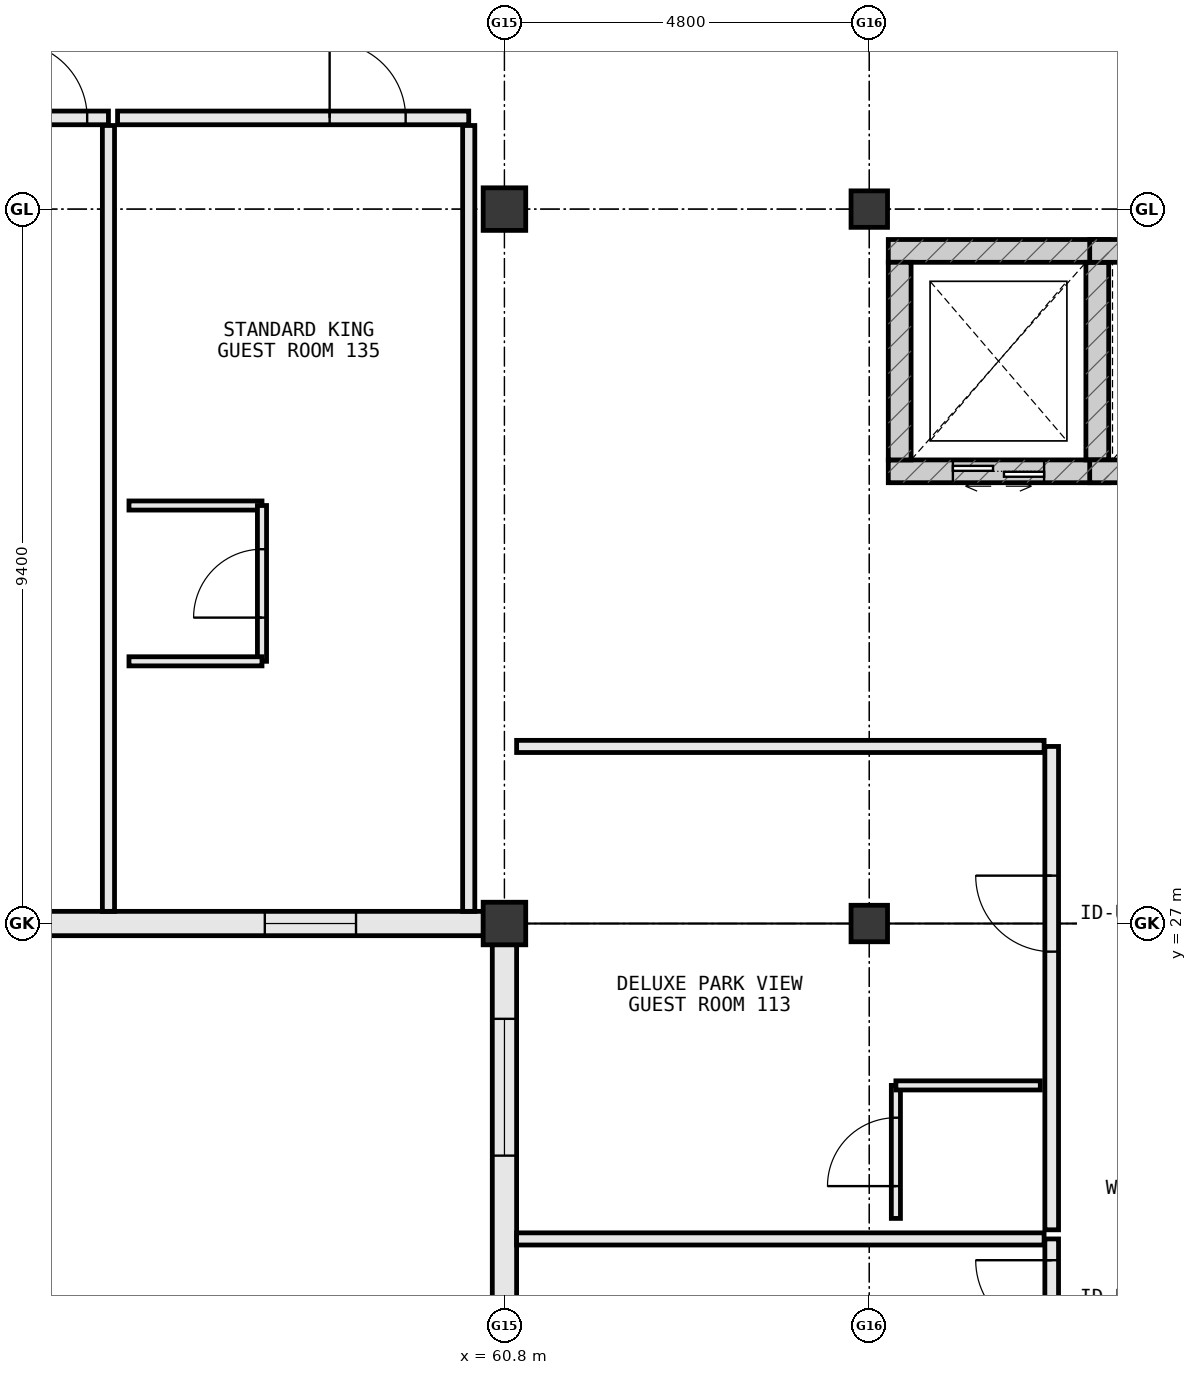
"""IFC4 building model, lengths in metres.
Left out: names, types, materials, properties, quantities, classifications, styles, units other than length and angle.
Written with IfcOpenShell. Run it as: python <this file> out.ifc"""

import sys

from ifc_helpers import new_model, si_unit, direction, frame, frame_2d, origin, origin_2d, place, context, subcontext, project, spatial, rectangle, extrude, element, fill, save


model = new_model("IFC4")
c1 = context("Model", 3, precision=1e-05, world=origin(), true_north=direction((0.0, 1.0)))
c2 = subcontext(c1, "Body", "Model", "MODEL_VIEW")
j1 = project(units=[si_unit("LENGTHUNIT", "METRE"), si_unit("PLANEANGLEUNIT", "RADIAN")], contexts=[c1])
p1 = place(None, origin())
s1 = spatial("IfcSite", under=j1, at=p1, CompositionType="ELEMENT")
p2 = place(p1, origin())
s2 = spatial("IfcBuilding", under=s1, at=p2, CompositionType="ELEMENT")
p3 = place(p2, frame((0.0, 0.0, 20.0)))
s3 = spatial("IfcBuildingStorey", under=s2, at=p3, CompositionType="ELEMENT", Elevation=20.0)
for number, where, z_axis, x_axis in (
    (1, (60.8, 27.0, 0.0), (0.0, 0.0, 1.0), (1.0, 0.0, 0.0)),
    (2, (60.8, 36.4, 0.0), (0.0, 0.0, 1.0), (1.0, 0.0, 0.0)),
):
    element("IfcColumn", number, at=place(p3, frame(where, z_axis=z_axis, x_axis=x_axis)), inside=s3, PredefinedType="COLUMN", context=c2, shape_type="SweptSolid", body=[
        extrude(rectangle(XDim=0.56, YDim=0.56, at=origin_2d()), origin(), (0.0, 0.0, 1.0), 3.8),
    ])
for number, where, z_axis, x_axis in (
    (3, (65.6, 27.0, 0.0), (0.0, 0.0, 1.0), (1.0, 0.0, 0.0)),
    (4, (65.6, 36.4, 0.0), (0.0, 0.0, 1.0), (1.0, 0.0, 0.0)),
):
    element("IfcColumn", number, at=place(p3, frame(where, z_axis=z_axis, x_axis=x_axis)), inside=s3, PredefinedType="COLUMN", context=c2, shape_type="SweptSolid", body=[
        extrude(rectangle(XDim=0.48, YDim=0.48, at=origin_2d()), origin(), (0.0, 0.0, 1.0), 3.8),
    ])
p4 = place(p3, frame((51.423, 27.0, 0.0), z_axis=(0.0, 0.0, 1.0), x_axis=(1.0, 0.0, 0.0)))
e5 = element("IfcWall", 5, at=p4, inside=s3, PredefinedType="STANDARD", context=c2, shape_type="SweptSolid", body=[
    extrude(rectangle(XDim=9.099, YDim=0.32, at=frame_2d((4.549, 0.0))), origin(), (0.0, 0.0, 1.0), 2.785),
])
p5 = place(p4, frame((1.675, 0.0, 0.85)))
e6 = element("IfcOpeningElement", 6, at=p5, cuts=e5, PredefinedType="OPENING", context=c2, shape_type="SweptSolid", body=[
    extrude(rectangle(XDim=1.2, YDim=1.55, at=frame_2d((0.6, 0.775))), frame((0.0, 0.172, 0.0), z_axis=(0.0, -1.0, 0.0), x_axis=(1.0, 0.0, 0.0)), (0.0, 0.0, 1.0), 0.344),
])
p6 = place(p4, frame((6.224, 0.0, 0.85)))
e7 = element("IfcOpeningElement", 7, at=p6, cuts=e5, PredefinedType="OPENING", context=c2, shape_type="SweptSolid", body=[
    extrude(rectangle(XDim=1.2, YDim=1.55, at=frame_2d((0.6, 0.775))), frame((0.0, 0.172, 0.0), z_axis=(0.0, -1.0, 0.0), x_axis=(1.0, 0.0, 0.0)), (0.0, 0.0, 1.0), 0.344),
])
p7 = place(p3, frame((60.8, 26.722, 0.0), z_axis=(0.0, 0.0, 1.0), x_axis=(0.0, -1.0, 0.0)))
e8 = element("IfcWall", 8, at=p7, inside=s3, PredefinedType="STANDARD", context=c2, shape_type="SweptSolid", body=[
    extrude(rectangle(XDim=7.844, YDim=0.32, at=frame_2d((3.922, 0.0))), origin(), (0.0, 0.0, 1.0), 3.005),
])
p8 = place(p7, frame((4.632, 0.0, 0.85)))
e9 = element("IfcOpeningElement", 9, at=p8, cuts=e8, PredefinedType="OPENING", context=c2, shape_type="SweptSolid", body=[
    extrude(rectangle(XDim=1.8, YDim=1.85, at=frame_2d((0.9, 0.925))), frame((0.0, 0.172, 0.0), z_axis=(0.0, -1.0, 0.0), x_axis=(1.0, 0.0, 0.0)), (0.0, 0.0, 1.0), 0.344),
])
p9 = place(p7, frame((0.976, 0.0, 0.85)))
e10 = element("IfcOpeningElement", 10, at=p9, cuts=e8, PredefinedType="OPENING", context=c2, shape_type="SweptSolid", body=[
    extrude(rectangle(XDim=1.8, YDim=1.85, at=frame_2d((0.9, 0.925))), frame((0.0, 0.172, 0.0), z_axis=(0.0, -1.0, 0.0), x_axis=(1.0, 0.0, 0.0)), (0.0, 0.0, 1.0), 0.344),
])
p10 = place(p3, frame((65.85, 32.95, 0.0), z_axis=(0.0, 0.0, 1.0), x_axis=(1.0, 0.0, 0.0)))
e11 = element("IfcWall", 11, at=p10, inside=s3, PredefinedType="SHEAR", context=c2, shape_type="SweptSolid", body=[
    extrude(rectangle(XDim=2.9, YDim=0.3, at=frame_2d((1.45, 0.0))), origin(), (0.0, 0.0, 1.0), 3.8),
])
p11 = place(p10, frame((0.85, 0.0, 0.0)))
e12 = element("IfcOpeningElement", 12, at=p11, cuts=e11, PredefinedType="OPENING", context=c2, shape_type="SweptSolid", body=[
    extrude(rectangle(XDim=1.2, YDim=2.2, at=frame_2d((0.6, 1.1))), frame((0.0, 0.162, 0.0), z_axis=(0.0, -1.0, 0.0), x_axis=(1.0, 0.0, 0.0)), (0.0, 0.0, 1.0), 0.324),
])
p12 = place(p3, frame((68.75, 35.85, 0.0), z_axis=(0.0, 0.0, 1.0), x_axis=(-1.0, 0.0, 0.0)))
e13 = element("IfcWall", 13, at=p12, inside=s3, PredefinedType="SHEAR", context=c2, shape_type="SweptSolid", body=[
    extrude(rectangle(XDim=2.9, YDim=0.3, at=frame_2d((1.45, 0.0))), origin(), (0.0, 0.0, 1.0), 3.8),
])
for number, where, z_axis, x_axis in (
    (14, (68.6, 33.1, 0.0), (0.0, 0.0, 1.0), (0.0, 1.0, 0.0)),
    (15, (66.0, 35.7, 0.0), (0.0, 0.0, 1.0), (0.0, -1.0, 0.0)),
):
    element("IfcWall", number, at=place(p3, frame(where, z_axis=z_axis, x_axis=x_axis)), inside=s3, PredefinedType="SHEAR", context=c2, shape_type="SweptSolid", body=[
        extrude(rectangle(XDim=2.6, YDim=0.3, at=frame_2d((1.3, 0.0))), origin(), (0.0, 0.0, 1.0), 3.8),
    ])
p13 = place(p3, frame((68.5, 32.95, 0.0), z_axis=(0.0, 0.0, 1.0), x_axis=(1.0, 0.0, 0.0)))
e16 = element("IfcWall", 16, at=p13, inside=s3, PredefinedType="SHEAR", context=c2, shape_type="SweptSolid", body=[
    extrude(rectangle(XDim=2.9, YDim=0.3, at=frame_2d((1.45, 0.0))), origin(), (0.0, 0.0, 1.0), 3.8),
])
p14 = place(p13, frame((0.85, 0.0, 0.0)))
e17 = element("IfcOpeningElement", 17, at=p14, cuts=e16, PredefinedType="OPENING", context=c2, shape_type="SweptSolid", body=[
    extrude(rectangle(XDim=1.2, YDim=2.2, at=frame_2d((0.6, 1.1))), frame((0.0, 0.162, 0.0), z_axis=(0.0, -1.0, 0.0), x_axis=(1.0, 0.0, 0.0)), (0.0, 0.0, 1.0), 0.324),
])
p15 = place(p3, frame((71.4, 35.85, 0.0), z_axis=(0.0, 0.0, 1.0), x_axis=(-1.0, 0.0, 0.0)))
e18 = element("IfcWall", 18, at=p15, inside=s3, PredefinedType="SHEAR", context=c2, shape_type="SweptSolid", body=[
    extrude(rectangle(XDim=2.9, YDim=0.3, at=frame_2d((1.45, 0.0))), origin(), (0.0, 0.0, 1.0), 3.8),
])
p16 = place(p3, frame((68.0, 19.53, 0.0), z_axis=(0.0, 0.0, 1.0), x_axis=(0.0, 1.0, 0.0)))
e19 = element("IfcWall", 19, at=p16, inside=s3, PredefinedType="PARTITIONING", context=c2, shape_type="SweptSolid", body=[
    extrude(rectangle(XDim=3.32, YDim=0.18, at=frame_2d((1.66, 0.0))), origin(), (0.0, 0.0, 1.0), 3.55),
])
p17 = place(p16, frame((2.04, 0.0, 0.0)))
e20 = element("IfcOpeningElement", 20, at=p17, cuts=e19, PredefinedType="OPENING", context=c2, shape_type="SweptSolid", body=[
    extrude(rectangle(XDim=1.0, YDim=2.2, at=frame_2d((0.5, 1.1))), frame((0.0, 0.102, 0.0), z_axis=(0.0, -1.0, 0.0), x_axis=(1.0, 0.0, 0.0)), (0.0, 0.0, 1.0), 0.204),
])
p18 = place(p3, frame((60.96, 22.85, 0.0), z_axis=(0.0, 0.0, 1.0), x_axis=(1.0, 0.0, 0.0)))
e21 = element("IfcWall", 21, at=p18, inside=s3, PredefinedType="PARTITIONING", context=c2, shape_type="SweptSolid", body=[
    extrude(rectangle(XDim=6.94, YDim=0.16, at=frame_2d((3.47, 0.0))), origin(), (0.0, 0.0, 1.0), 3.55),
])
p19 = place(p3, frame((68.0, 22.97, 0.0), z_axis=(0.0, 0.0, 1.0), x_axis=(0.0, 1.0, 0.0)))
e22 = element("IfcWall", 22, at=p19, inside=s3, PredefinedType="PARTITIONING", context=c2, shape_type="SweptSolid", body=[
    extrude(rectangle(XDim=6.36, YDim=0.18, at=frame_2d((3.18, 0.0))), origin(), (0.0, 0.0, 1.0), 3.55),
])
p20 = place(p19, frame((3.66, 0.0, 0.0)))
e23 = element("IfcOpeningElement", 23, at=p20, cuts=e22, PredefinedType="OPENING", context=c2, shape_type="SweptSolid", body=[
    extrude(rectangle(XDim=1.0, YDim=2.2, at=frame_2d((0.5, 1.1))), frame((0.0, 0.102, 0.0), z_axis=(0.0, -1.0, 0.0), x_axis=(1.0, 0.0, 0.0)), (0.0, 0.0, 1.0), 0.204),
])
p21 = place(p3, frame((60.96, 29.33, 0.0), z_axis=(0.0, 0.0, 1.0), x_axis=(1.0, 0.0, 0.0)))
e24 = element("IfcWall", 24, at=p21, inside=s3, PredefinedType="PARTITIONING", context=c2, shape_type="SweptSolid", body=[
    extrude(rectangle(XDim=6.94, YDim=0.16, at=frame_2d((3.47, 0.0))), origin(), (0.0, 0.0, 1.0), 3.55),
])
p22 = place(p3, frame((65.95, 23.12, 0.0), z_axis=(0.0, 0.0, 1.0), x_axis=(0.0, 1.0, 0.0)))
e25 = element("IfcWall", 25, at=p22, inside=s3, PredefinedType="PARTITIONING", context=c2, shape_type="SweptSolid", body=[
    extrude(rectangle(XDim=1.75, YDim=0.12, at=frame_2d((0.875, 0.0))), origin(), (0.0, 0.0, 1.0), 3.005),
])
p23 = place(p22, frame((0.425, 0.0, 0.0)))
e26 = element("IfcOpeningElement", 26, at=p23, cuts=e25, PredefinedType="OPENING", context=c2, shape_type="SweptSolid", body=[
    extrude(rectangle(XDim=0.9, YDim=2.15, at=frame_2d((0.45, 1.075))), frame((0.0, 0.072, 0.0), z_axis=(0.0, -1.0, 0.0), x_axis=(1.0, 0.0, 0.0)), (0.0, 0.0, 1.0), 0.144),
])
p24 = place(p3, frame((65.95, 24.87, 0.0), z_axis=(0.0, 0.0, 1.0), x_axis=(1.0, 0.0, 0.0)))
e27 = element("IfcWall", 27, at=p24, inside=s3, PredefinedType="PARTITIONING", context=c2, shape_type="SweptSolid", body=[
    extrude(rectangle(XDim=1.9, YDim=0.12, at=frame_2d((0.95, 0.0))), origin(), (0.0, 0.0, 1.0), 3.55),
])
p25 = place(p3, frame((55.59, 37.6, 0.0), z_axis=(0.0, 0.0, 1.0), x_axis=(-1.0, 0.0, 0.0)))
e28 = element("IfcWall", 28, at=p25, inside=s3, PredefinedType="PARTITIONING", context=c2, shape_type="SweptSolid", body=[
    extrude(rectangle(XDim=3.32, YDim=0.18, at=frame_2d((1.66, 0.0))), origin(), (0.0, 0.0, 1.0), 3.55),
])
p26 = place(p25, frame((0.28, 0.0, 0.0)))
e29 = element("IfcOpeningElement", 29, at=p26, cuts=e28, PredefinedType="OPENING", context=c2, shape_type="SweptSolid", body=[
    extrude(rectangle(XDim=1.0, YDim=2.2, at=frame_2d((0.5, 1.1))), frame((0.0, 0.102, 0.0), z_axis=(0.0, -1.0, 0.0), x_axis=(1.0, 0.0, 0.0)), (0.0, 0.0, 1.0), 0.204),
])
p27 = place(p3, frame((55.59, 27.16, 0.0), z_axis=(0.0, 0.0, 1.0), x_axis=(0.0, 1.0, 0.0)))
e30 = element("IfcWall", 30, at=p27, inside=s3, PredefinedType="PARTITIONING", context=c2, shape_type="SweptSolid", body=[
    extrude(rectangle(XDim=10.34, YDim=0.16, at=frame_2d((5.17, 0.0))), origin(), (0.0, 0.0, 1.0), 3.55),
])
p28 = place(p3, frame((60.33, 37.6, 0.0), z_axis=(0.0, 0.0, 1.0), x_axis=(-1.0, 0.0, 0.0)))
e31 = element("IfcWall", 31, at=p28, inside=s3, PredefinedType="PARTITIONING", context=c2, shape_type="SweptSolid", body=[
    extrude(rectangle(XDim=4.62, YDim=0.18, at=frame_2d((2.31, 0.0))), origin(), (0.0, 0.0, 1.0), 3.55),
])
p29 = place(p28, frame((0.83, 0.0, 0.0)))
e32 = element("IfcOpeningElement", 32, at=p29, cuts=e31, PredefinedType="OPENING", context=c2, shape_type="SweptSolid", body=[
    extrude(rectangle(XDim=1.0, YDim=2.2, at=frame_2d((0.5, 1.1))), frame((0.0, 0.102, 0.0), z_axis=(0.0, -1.0, 0.0), x_axis=(1.0, 0.0, 0.0)), (0.0, 0.0, 1.0), 0.204),
])
p30 = place(p3, frame((60.33, 27.16, 0.0), z_axis=(0.0, 0.0, 1.0), x_axis=(0.0, 1.0, 0.0)))
e33 = element("IfcWall", 33, at=p30, inside=s3, PredefinedType="PARTITIONING", context=c2, shape_type="SweptSolid", body=[
    extrude(rectangle(XDim=10.34, YDim=0.16, at=frame_2d((5.17, 0.0))), origin(), (0.0, 0.0, 1.0), 3.55),
])
p31 = place(p3, frame((55.86, 32.5, 0.0), z_axis=(0.0, 0.0, 1.0), x_axis=(1.0, 0.0, 0.0)))
e34 = element("IfcWall", 34, at=p31, inside=s3, PredefinedType="PARTITIONING", context=c2, shape_type="SweptSolid", body=[
    extrude(rectangle(XDim=1.75, YDim=0.12, at=frame_2d((0.875, 0.0))), origin(), (0.0, 0.0, 1.0), 3.55),
])
p32 = place(p3, frame((57.61, 30.45, 0.0), z_axis=(0.0, 0.0, 1.0), x_axis=(0.0, 1.0, 0.0)))
e35 = element("IfcWall", 35, at=p32, inside=s3, PredefinedType="PARTITIONING", context=c2, shape_type="SweptSolid", body=[
    extrude(rectangle(XDim=2.05, YDim=0.12, at=frame_2d((1.025, 0.0))), origin(), (0.0, 0.0, 1.0), 3.095),
])
p33 = place(p32, frame((0.575, 0.0, 0.0)))
e36 = element("IfcOpeningElement", 36, at=p33, cuts=e35, PredefinedType="OPENING", context=c2, shape_type="SweptSolid", body=[
    extrude(rectangle(XDim=0.9, YDim=2.15, at=frame_2d((0.45, 1.075))), frame((0.0, 0.072, 0.0), z_axis=(0.0, -1.0, 0.0), x_axis=(1.0, 0.0, 0.0)), (0.0, 0.0, 1.0), 0.144),
])
p34 = place(p3, frame((55.86, 30.45, 0.0), z_axis=(0.0, 0.0, 1.0), x_axis=(1.0, 0.0, 0.0)))
e37 = element("IfcWall", 37, at=p34, inside=s3, PredefinedType="PARTITIONING", context=c2, shape_type="SweptSolid", body=[
    extrude(rectangle(XDim=1.75, YDim=0.12, at=frame_2d((0.875, 0.0))), origin(), (0.0, 0.0, 1.0), 3.55),
])
p35 = place(p6, origin())
e38 = element("IfcWindow", 38, at=p35, inside=s3, PartitioningType="SINGLE_PANEL", PredefinedType="WINDOW", context=c2, shape_type="SweptSolid", body=[
    extrude(rectangle(XDim=1.2, YDim=1.55, at=frame_2d((0.6, 0.775))), frame((0.0, 0.03, 0.0), z_axis=(0.0, -1.0, 0.0), x_axis=(1.0, 0.0, 0.0)), (0.0, 0.0, 1.0), 0.06),
])
fill(e7, e38)
p36 = place(p9, origin())
e39 = element("IfcWindow", 39, at=p36, inside=s3, PartitioningType="SINGLE_PANEL", PredefinedType="WINDOW", context=c2, shape_type="SweptSolid", body=[
    extrude(rectangle(XDim=1.8, YDim=1.85, at=frame_2d((0.9, 0.925))), frame((0.0, 0.03, 0.0), z_axis=(0.0, -1.0, 0.0), x_axis=(1.0, 0.0, 0.0)), (0.0, 0.0, 1.0), 0.06),
])
fill(e10, e39)
p37 = place(p11, origin())
e40 = element("IfcDoor", 40, at=p37, inside=s3, OperationType="DOUBLE_DOOR_SLIDING", PredefinedType="DOOR", context=c2, shape_type="SweptSolid", body=[
    extrude(rectangle(XDim=1.2, YDim=2.2, at=frame_2d((0.6, 1.1))), frame((0.0, 0.025, 0.0), z_axis=(0.0, -1.0, 0.0), x_axis=(1.0, 0.0, 0.0)), (0.0, 0.0, 1.0), 0.05),
])
fill(e12, e40)
p38 = place(p17, origin())
e41 = element("IfcDoor", 41, at=p38, inside=s3, OperationType="SINGLE_SWING_RIGHT", PredefinedType="DOOR", context=c2, shape_type="SweptSolid", body=[
    extrude(rectangle(XDim=1.0, YDim=2.2, at=frame_2d((0.5, 1.1))), frame((0.0, 0.025, 0.0), z_axis=(0.0, -1.0, 0.0), x_axis=(1.0, 0.0, 0.0)), (0.0, 0.0, 1.0), 0.05),
])
fill(e20, e41)
p39 = place(p20, origin())
e42 = element("IfcDoor", 42, at=p39, inside=s3, OperationType="SINGLE_SWING_RIGHT", PredefinedType="DOOR", context=c2, shape_type="SweptSolid", body=[
    extrude(rectangle(XDim=1.0, YDim=2.2, at=frame_2d((0.5, 1.1))), frame((0.0, 0.025, 0.0), z_axis=(0.0, -1.0, 0.0), x_axis=(1.0, 0.0, 0.0)), (0.0, 0.0, 1.0), 0.05),
])
fill(e23, e42)
p40 = place(p23, origin())
e43 = element("IfcDoor", 43, at=p40, inside=s3, OperationType="SINGLE_SWING_LEFT", PredefinedType="DOOR", context=c2, shape_type="SweptSolid", body=[
    extrude(rectangle(XDim=0.9, YDim=2.15, at=frame_2d((0.45, 1.075))), frame((0.0, 0.025, 0.0), z_axis=(0.0, -1.0, 0.0), x_axis=(1.0, 0.0, 0.0)), (0.0, 0.0, 1.0), 0.05),
])
fill(e26, e43)
p41 = place(p26, frame((1.0, 0.0, 0.0), z_axis=(0.0, 0.0, 1.0), x_axis=(-1.0, 0.0, 0.0)))
e44 = element("IfcDoor", 44, at=p41, inside=s3, OperationType="SINGLE_SWING_RIGHT", PredefinedType="DOOR", context=c2, shape_type="SweptSolid", body=[
    extrude(rectangle(XDim=1.0, YDim=2.2, at=frame_2d((0.5, 1.1))), frame((0.0, 0.025, 0.0), z_axis=(0.0, -1.0, 0.0), x_axis=(1.0, 0.0, 0.0)), (0.0, 0.0, 1.0), 0.05),
])
fill(e29, e44)
p42 = place(p29, frame((1.0, 0.0, 0.0), z_axis=(0.0, 0.0, 1.0), x_axis=(-1.0, 0.0, 0.0)))
e45 = element("IfcDoor", 45, at=p42, inside=s3, OperationType="SINGLE_SWING_RIGHT", PredefinedType="DOOR", context=c2, shape_type="SweptSolid", body=[
    extrude(rectangle(XDim=1.0, YDim=2.2, at=frame_2d((0.5, 1.1))), frame((0.0, 0.025, 0.0), z_axis=(0.0, -1.0, 0.0), x_axis=(1.0, 0.0, 0.0)), (0.0, 0.0, 1.0), 0.05),
])
fill(e32, e45)
p43 = place(p33, origin())
e46 = element("IfcDoor", 46, at=p43, inside=s3, OperationType="SINGLE_SWING_LEFT", PredefinedType="DOOR", context=c2, shape_type="SweptSolid", body=[
    extrude(rectangle(XDim=0.9, YDim=2.15, at=frame_2d((0.45, 1.075))), frame((0.0, 0.025, 0.0), z_axis=(0.0, -1.0, 0.0), x_axis=(1.0, 0.0, 0.0)), (0.0, 0.0, 1.0), 0.05),
])
fill(e36, e46)
save(model, sys.argv[1])
